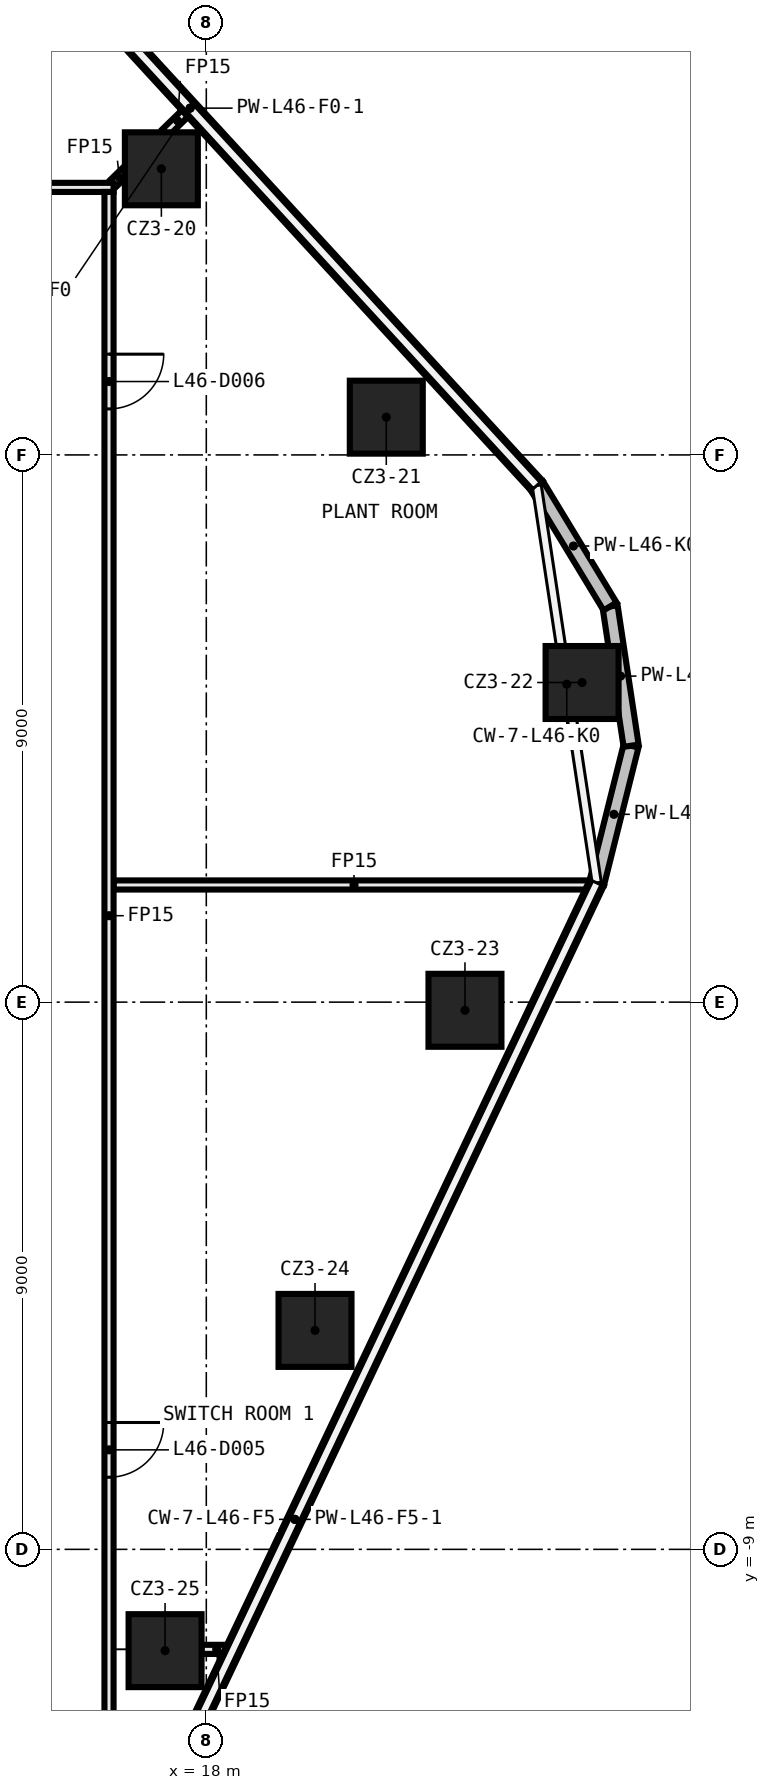
"""IFC4 building model, lengths in metres.
Left out: names, types, materials, properties, quantities, classifications, styles, units other than length and angle.
Written with IfcOpenShell. Run it as: python <this file> out.ifc"""

import sys

from ifc_helpers import new_model, si_unit, direction, frame, frame_2d, origin, origin_2d, place, context, subcontext, project, spatial, rectangle, extrude, element, fill, save


model = new_model("IFC4")
c1 = context("Model", 3, precision=1e-05, world=origin(), true_north=direction((0.0, 1.0)))
c2 = subcontext(c1, "Body", "Model", "MODEL_VIEW")
j1 = project(units=[si_unit("LENGTHUNIT", "METRE"), si_unit("PLANEANGLEUNIT", "RADIAN")], contexts=[c1])
p1 = place(None, origin())
s1 = spatial("IfcSite", under=j1, at=p1, CompositionType="ELEMENT")
p2 = place(p1, origin())
s2 = spatial("IfcBuilding", under=s1, at=p2, CompositionType="ELEMENT")
p3 = place(p2, frame((0.0, 0.0, 220.6)))
s3 = spatial("IfcBuildingStorey", under=s2, at=p3, CompositionType="ELEMENT", Elevation=220.6)
for number, where, z_axis, x_axis in (
    (1, (17.261, 13.706, 0.0), (0.0, 0.0, 1.0), (1.0, 0.0, 0.0)),
    (2, (20.96, 9.621, 0.0), (0.0, 0.0, 1.0), (1.0, 0.0, 0.0)),
    (3, (24.18, 5.257, 0.0), (0.0, 0.0, 1.0), (1.0, 0.0, 0.0)),
    (4, (22.254, -0.134, 0.0), (0.0, 0.0, 1.0), (1.0, 0.0, 0.0)),
    (5, (19.788, -5.399, 0.0), (0.0, 0.0, 1.0), (1.0, 0.0, 0.0)),
    (6, (17.322, -10.666, 0.0), (0.0, 0.0, 1.0), (1.0, 0.0, 0.0)),
):
    element("IfcColumn", number, at=place(p3, frame(where, z_axis=z_axis, x_axis=x_axis)), inside=s3, PredefinedType="COLUMN", context=c2, shape_type="SweptSolid", body=[
        extrude(rectangle(XDim=1.2, YDim=1.2, at=origin_2d()), origin(), (0.0, 0.0, 1.0), 7.55),
    ])
p4 = place(p3, frame((17.922, -10.645, 0.0), z_axis=(0.0, 0.0, 1.0), x_axis=(1.0, 0.0, 0.0)))
e7 = element("IfcWall", 7, at=p4, inside=s3, PredefinedType="PARTITIONING", context=c2, shape_type="SweptSolid", body=[
    extrude(rectangle(XDim=0.499, YDim=0.15, at=frame_2d((0.249, 0.0))), origin(), (0.0, 0.0, 1.0), 7.55),
])
p5 = place(p3, frame((16.475, 1.927, 0.0), z_axis=(0.0, 0.0, 1.0), x_axis=(1.0, 0.0, 0.0)))
e8 = element("IfcWall", 8, at=p5, inside=s3, PredefinedType="PARTITIONING", context=c2, shape_type="SweptSolid", body=[
    extrude(rectangle(XDim=7.908, YDim=0.15, at=frame_2d((3.954, 0.0))), origin(), (0.0, 0.0, 1.0), 7.55),
])
p6 = place(p3, frame((-16.475, 13.4, 0.0), z_axis=(0.0, 0.0, 1.0), x_axis=(1.0, 0.0, 0.0)))
e9 = element("IfcWall", 9, at=p6, inside=s3, PredefinedType="PARTITIONING", context=c2, shape_type="SweptSolid", body=[
    extrude(rectangle(XDim=32.95, YDim=0.15, at=frame_2d((16.475, 0.0))), origin(), (0.0, 0.0, 1.0), 7.55),
])
p7 = place(p6, frame((23.069, 0.0, 0.0)))
e10 = element("IfcOpeningElement", 10, at=p7, cuts=e9, PredefinedType="OPENING", context=c2, shape_type="SweptSolid", body=[
    extrude(rectangle(XDim=0.9, YDim=2.1, at=frame_2d((0.45, 1.05))), frame((0.0, 0.085, 0.0), z_axis=(0.0, -1.0, 0.0), x_axis=(1.0, 0.0, 0.0)), (0.0, 0.0, 1.0), 0.17),
])
p8 = place(p6, frame((17.244, 0.0, 0.0)))
e11 = element("IfcOpeningElement", 11, at=p8, cuts=e9, PredefinedType="OPENING", context=c2, shape_type="SweptSolid", body=[
    extrude(rectangle(XDim=0.9, YDim=2.1, at=frame_2d((0.45, 1.05))), frame((0.0, 0.085, 0.0), z_axis=(0.0, -1.0, 0.0), x_axis=(1.0, 0.0, 0.0)), (0.0, 0.0, 1.0), 0.17),
])
p9 = place(p6, frame((14.382, 0.0, 0.0)))
e12 = element("IfcOpeningElement", 12, at=p9, cuts=e9, PredefinedType="OPENING", context=c2, shape_type="SweptSolid", body=[
    extrude(rectangle(XDim=0.9, YDim=2.1, at=frame_2d((0.45, 1.05))), frame((0.0, 0.085, 0.0), z_axis=(0.0, -1.0, 0.0), x_axis=(1.0, 0.0, 0.0)), (0.0, 0.0, 1.0), 0.17),
])
p10 = place(p6, frame((8.874, 0.0, 0.0)))
e13 = element("IfcOpeningElement", 13, at=p10, cuts=e9, PredefinedType="OPENING", context=c2, shape_type="SweptSolid", body=[
    extrude(rectangle(XDim=0.9, YDim=2.1, at=frame_2d((0.45, 1.05))), frame((0.0, 0.085, 0.0), z_axis=(0.0, -1.0, 0.0), x_axis=(1.0, 0.0, 0.0)), (0.0, 0.0, 1.0), 0.17),
])
p11 = place(p6, frame((5.575, 0.0, 0.0)))
e14 = element("IfcOpeningElement", 14, at=p11, cuts=e9, PredefinedType="OPENING", context=c2, shape_type="SweptSolid", body=[
    extrude(rectangle(XDim=0.9, YDim=2.1, at=frame_2d((0.45, 1.05))), frame((0.0, 0.085, 0.0), z_axis=(0.0, -1.0, 0.0), x_axis=(1.0, 0.0, 0.0)), (0.0, 0.0, 1.0), 0.17),
])
p12 = place(p3, frame((16.478, 13.475, 0.0), z_axis=(0.0, 0.0, 1.0), x_axis=(0.716596850533, 0.697487601185, 0.0)))
e15 = element("IfcWall", 15, at=p12, inside=s3, PredefinedType="PARTITIONING", context=c2, shape_type="SweptSolid", body=[
    extrude(rectangle(XDim=0.256, YDim=0.15, at=frame_2d((0.128, 0.0))), origin(), (0.0, 0.0, 1.0), 7.55),
])
p13 = place(p3, frame((17.332, 14.306, 0.0), z_axis=(0.0, 0.0, 1.0), x_axis=(0.716671472449, 0.697410926627, 0.0)))
e16 = element("IfcWall", 16, at=p13, inside=s3, PredefinedType="PARTITIONING", context=c2, shape_type="SweptSolid", body=[
    extrude(rectangle(XDim=0.545, YDim=0.15, at=frame_2d((0.272, 0.0))), origin(), (0.0, 0.0, 1.0), 7.55),
])
p14 = place(p3, frame((16.4, 13.325, 0.0), z_axis=(0.0, 0.0, 1.0), x_axis=(0.0, -1.0, 0.0)))
e17 = element("IfcWall", 17, at=p14, inside=s3, PredefinedType="PARTITIONING", context=c2, shape_type="SweptSolid", body=[
    extrude(rectangle(XDim=26.65, YDim=0.15, at=frame_2d((13.325, 0.0))), origin(), (0.0, 0.0, 1.0), 7.55),
])
p15 = place(p14, frame((20.239, 0.0, 0.0)))
e18 = element("IfcOpeningElement", 18, at=p15, cuts=e17, PredefinedType="OPENING", context=c2, shape_type="SweptSolid", body=[
    extrude(rectangle(XDim=0.9, YDim=2.1, at=frame_2d((0.45, 1.05))), frame((0.0, 0.085, 0.0), z_axis=(0.0, -1.0, 0.0), x_axis=(1.0, 0.0, 0.0)), (0.0, 0.0, 1.0), 0.17),
])
p16 = place(p14, frame((2.668, 0.0, 0.0)))
e19 = element("IfcOpeningElement", 19, at=p16, cuts=e17, PredefinedType="OPENING", context=c2, shape_type="SweptSolid", body=[
    extrude(rectangle(XDim=0.9, YDim=2.1, at=frame_2d((0.45, 1.05))), frame((0.0, 0.085, 0.0), z_axis=(0.0, -1.0, 0.0), x_axis=(1.0, 0.0, 0.0)), (0.0, 0.0, 1.0), 0.17),
])
p17 = place(p3, frame((24.422, 1.961, 0.0), z_axis=(0.0, 0.0, 1.0), x_axis=(0.242757873534, 0.970086910971, 0.0)))
e20 = element("IfcWall", 20, at=p17, inside=s3, PredefinedType="SOLIDWALL", context=c2, shape_type="SweptSolid", body=[
    extrude(rectangle(XDim=2.326, YDim=0.25, at=frame_2d((1.163, 0.0))), origin(), (0.0, 0.0, 1.0), 7.55),
])
p18 = place(p3, frame((24.987, 4.218, 0.0), z_axis=(0.0, 0.0, 1.0), x_axis=(-0.149371313853, 0.988781174274, 0.0)))
e21 = element("IfcWall", 21, at=p18, inside=s3, PredefinedType="SOLIDWALL", context=c2, shape_type="SweptSolid", body=[
    extrude(rectangle(XDim=2.316, YDim=0.25, at=frame_2d((1.158, 0.0))), origin(), (0.0, 0.0, 1.0), 7.55),
])
p19 = place(p3, frame((24.641, 6.508, 0.0), z_axis=(0.0, 0.0, 1.0), x_axis=(-0.518687790658, 0.854963727782, 0.0)))
e22 = element("IfcWall", 22, at=p19, inside=s3, PredefinedType="SOLIDWALL", context=c2, shape_type="SweptSolid", body=[
    extrude(rectangle(XDim=2.326, YDim=0.25, at=frame_2d((1.163, 0.0))), origin(), (0.0, 0.0, 1.0), 7.55),
])
p20 = place(p3, frame((23.434, 8.496, 0.0), z_axis=(0.0, 0.0, 1.0), x_axis=(-0.676389444632, 0.736544173278, 0.0)))
e23 = element("IfcWall", 23, at=p20, inside=s3, PredefinedType="SOLIDWALL", context=c2, shape_type="SweptSolid", body=[
    extrude(rectangle(XDim=16.855, YDim=0.25, at=frame_2d((8.428, 0.0))), origin(), (0.0, 0.0, 1.0), 7.55),
])
p21 = place(p3, frame((14.492, -18.975, 0.0), z_axis=(0.0, 0.0, 1.0), x_axis=(0.428543737813, 0.903521037265, 0.0)))
e24 = element("IfcWall", 24, at=p21, inside=s3, PredefinedType="SOLIDWALL", context=c2, shape_type="SweptSolid", body=[
    extrude(rectangle(XDim=23.171, YDim=0.25, at=frame_2d((11.586, 0.0))), origin(), (0.0, 0.0, 1.0), 7.55),
])
p22 = place(p15, origin())
e25 = element("IfcDoor", 25, at=p22, inside=s3, OperationType="SINGLE_SWING_RIGHT", PredefinedType="DOOR", context=c2, shape_type="SweptSolid", body=[
    extrude(rectangle(XDim=0.9, YDim=2.1, at=frame_2d((0.45, 1.05))), frame((0.0, 0.025, 0.0), z_axis=(0.0, -1.0, 0.0), x_axis=(1.0, 0.0, 0.0)), (0.0, 0.0, 1.0), 0.05),
])
fill(e18, e25)
p23 = place(p16, origin())
e26 = element("IfcDoor", 26, at=p23, inside=s3, OperationType="SINGLE_SWING_LEFT", PredefinedType="DOOR", context=c2, shape_type="SweptSolid", body=[
    extrude(rectangle(XDim=0.9, YDim=2.1, at=frame_2d((0.45, 1.05))), frame((0.0, 0.025, 0.0), z_axis=(0.0, -1.0, 0.0), x_axis=(1.0, 0.0, 0.0)), (0.0, 0.0, 1.0), 0.05),
])
fill(e19, e26)
save(model, sys.argv[1])
